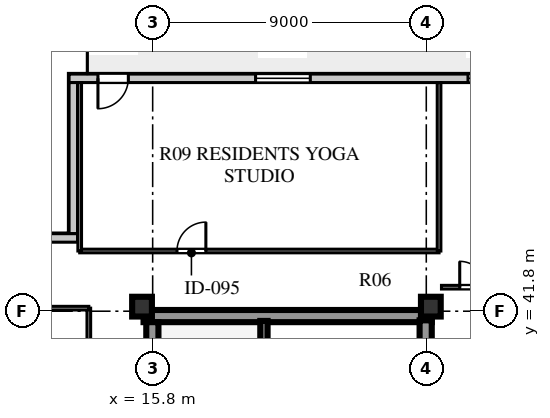
"""IFC4 building model, lengths in metres.
Left out: names, types, materials, properties, quantities, classifications, styles, units other than length and angle.
Written with IfcOpenShell. Run it as: python <this file> out.ifc"""

import sys

from ifc_helpers import new_model, si_unit, direction, frame, frame_2d, origin, origin_2d, place, context, subcontext, project, spatial, rectangle, extrude, element, fill, save


model = new_model("IFC4")
c1 = context("Model", 3, precision=1e-05, world=origin(), true_north=direction((0.0, 1.0)))
c2 = subcontext(c1, "Body", "Model", "MODEL_VIEW")
j1 = project(units=[si_unit("LENGTHUNIT", "METRE"), si_unit("PLANEANGLEUNIT", "RADIAN")], contexts=[c1])
p1 = place(None, origin())
s1 = spatial("IfcSite", under=j1, at=p1, CompositionType="ELEMENT")
p2 = place(p1, origin())
s2 = spatial("IfcBuilding", under=s1, at=p2, CompositionType="ELEMENT")
p3 = place(p2, frame((0.0, 0.0, 221.9)))
s3 = spatial("IfcBuildingStorey", under=s2, at=p3, CompositionType="ELEMENT", Elevation=221.9)
p4 = place(p3, frame((15.5, 41.64, 0.0), z_axis=(0.0, 0.0, 1.0), x_axis=(1.0, 0.0, 0.0)))
e1 = element("IfcWall", 1, at=p4, inside=s3, PredefinedType="SHEAR", context=c2, shape_type="SweptSolid", body=[
    extrude(rectangle(XDim=9.48, YDim=0.4, at=frame_2d((4.74, 0.0))), origin(), (0.0, 0.0, 1.0), 3.66),
])
p5 = place(p3, frame((15.79, 15.81, 0.0), z_axis=(0.0, 0.0, 1.0), x_axis=(0.0, 1.0, 0.0)))
e2 = element("IfcWall", 2, at=p5, inside=s3, PredefinedType="SHEAR", context=c2, shape_type="SweptSolid", body=[
    extrude(rectangle(XDim=25.63, YDim=0.4, at=frame_2d((12.815, 0.0))), origin(), (0.0, 0.0, 1.0), 3.66),
])
p6 = place(p3, frame((24.78, 15.74, 0.0), z_axis=(0.0, 0.0, 1.0), x_axis=(0.0, 1.0, 0.0)))
e3 = element("IfcWall", 3, at=p6, inside=s3, PredefinedType="SHEAR", context=c2, shape_type="SweptSolid", body=[
    extrude(rectangle(XDim=25.76, YDim=0.4, at=frame_2d((12.88, 0.0))), origin(), (0.0, 0.0, 1.0), 3.66),
])
p7 = place(p6, frame((1.61, 0.0, 0.0)))
e4 = element("IfcOpeningElement", 4, at=p7, cuts=e3, PredefinedType="OPENING", context=c2, shape_type="SweptSolid", body=[
    extrude(rectangle(XDim=1.2, YDim=2.1, at=frame_2d((0.6, 1.05))), frame((0.0, 0.21, 0.0), z_axis=(0.0, -1.0, 0.0), x_axis=(1.0, 0.0, 0.0)), (0.0, 0.0, 1.0), 0.42),
])
p8 = place(p6, frame((6.78, 0.0, 0.0)))
e5 = element("IfcOpeningElement", 5, at=p8, cuts=e3, PredefinedType="OPENING", context=c2, shape_type="SweptSolid", body=[
    extrude(rectangle(XDim=0.85, YDim=2.06, at=frame_2d((0.425, 1.03))), frame((0.0, 0.21, 0.0), z_axis=(0.0, -1.0, 0.0), x_axis=(1.0, 0.0, 0.0)), (0.0, 0.0, 1.0), 0.42),
])
p9 = place(p6, frame((12.11, 0.0, 0.0)))
e6 = element("IfcOpeningElement", 6, at=p9, cuts=e3, PredefinedType="OPENING", context=c2, shape_type="SweptSolid", body=[
    extrude(rectangle(XDim=1.5, YDim=2.12, at=frame_2d((0.75, 1.06))), frame((0.0, 0.21, 0.0), z_axis=(0.0, -1.0, 0.0), x_axis=(1.0, 0.0, 0.0)), (0.0, 0.0, 1.0), 0.42),
])
p10 = place(p6, frame((20.11, 0.0, 0.0)))
e7 = element("IfcOpeningElement", 7, at=p10, cuts=e3, PredefinedType="OPENING", context=c2, shape_type="SweptSolid", body=[
    extrude(rectangle(XDim=1.2, YDim=2.12, at=frame_2d((0.6, 1.06))), frame((0.0, 0.21, 0.0), z_axis=(0.0, -1.0, 0.0), x_axis=(1.0, 0.0, 0.0)), (0.0, 0.0, 1.0), 0.42),
])
p11 = place(p6, frame((24.01, 0.0, 0.0)))
e8 = element("IfcOpeningElement", 8, at=p11, cuts=e3, PredefinedType="OPENING", context=c2, shape_type="SweptSolid", body=[
    extrude(rectangle(XDim=0.95, YDim=2.1, at=frame_2d((0.475, 1.05))), frame((0.0, 0.21, 0.0), z_axis=(0.0, -1.0, 0.0), x_axis=(1.0, 0.0, 0.0)), (0.0, 0.0, 1.0), 0.42),
])
for number, where, z_axis, x_axis in (
    (9, (15.45, 41.95, 0.0), (0.0, 0.0, 1.0), (1.0, 0.0, 0.0)),
    (10, (24.95, 41.95, 0.0), (0.0, 0.0, 1.0), (1.0, 0.0, 0.0)),
):
    element("IfcColumn", number, at=place(p3, frame(where, z_axis=z_axis, x_axis=x_axis)), inside=s3, PredefinedType="COLUMN", context=c2, shape_type="SweptSolid", body=[
        extrude(rectangle(XDim=0.65, YDim=0.65, at=origin_2d()), origin(), (0.0, 0.0, 1.0), 3.66),
    ])
p12 = place(p3, frame((45.55, 49.46, 0.0), z_axis=(0.0, 0.0, 1.0), x_axis=(-1.0, 0.0, 0.0)))
e11 = element("IfcWall", 11, at=p12, inside=s3, PredefinedType="STANDARD", context=c2, shape_type="SweptSolid", body=[
    extrude(rectangle(XDim=32.5, YDim=0.28, at=frame_2d((16.25, 0.0))), origin(), (0.0, 0.0, 1.0), 3.66),
])
p13 = place(p12, frame((30.55, 0.0, 0.0)))
e12 = element("IfcOpeningElement", 12, at=p13, cuts=e11, PredefinedType="OPENING", context=c2, shape_type="SweptSolid", body=[
    extrude(rectangle(XDim=1.0, YDim=2.05, at=frame_2d((0.5, 1.025))), frame((0.0, 0.15, 0.0), z_axis=(0.0, -1.0, 0.0), x_axis=(1.0, 0.0, 0.0)), (0.0, 0.0, 1.0), 0.3),
])
p14 = place(p12, frame((24.565, 0.0, 0.8)))
e13 = element("IfcOpeningElement", 13, at=p14, cuts=e11, PredefinedType="OPENING", context=c2, shape_type="SweptSolid", body=[
    extrude(rectangle(XDim=1.8, YDim=2.0, at=frame_2d((0.9, 1.0))), frame((0.0, 0.15, 0.0), z_axis=(0.0, -1.0, 0.0), x_axis=(1.0, 0.0, 0.0)), (0.0, 0.0, 1.0), 0.3),
])
p15 = place(p12, frame((17.878, 0.0, 0.8)))
e14 = element("IfcOpeningElement", 14, at=p15, cuts=e11, PredefinedType="OPENING", context=c2, shape_type="SweptSolid", body=[
    extrude(rectangle(XDim=1.5, YDim=2.0, at=frame_2d((0.75, 1.0))), frame((0.0, 0.15, 0.0), z_axis=(0.0, -1.0, 0.0), x_axis=(1.0, 0.0, 0.0)), (0.0, 0.0, 1.0), 0.3),
])
p16 = place(p12, frame((13.278, 0.0, 0.8)))
e15 = element("IfcOpeningElement", 15, at=p16, cuts=e11, PredefinedType="OPENING", context=c2, shape_type="SweptSolid", body=[
    extrude(rectangle(XDim=1.2, YDim=1.75, at=frame_2d((0.6, 0.875))), frame((0.0, 0.15, 0.0), z_axis=(0.0, -1.0, 0.0), x_axis=(1.0, 0.0, 0.0)), (0.0, 0.0, 1.0), 0.3),
])
p17 = place(p12, frame((4.27, 0.0, 0.8)))
e16 = element("IfcOpeningElement", 16, at=p17, cuts=e11, PredefinedType="OPENING", context=c2, shape_type="SweptSolid", body=[
    extrude(rectangle(XDim=2.4, YDim=2.05, at=frame_2d((1.2, 1.025))), frame((0.0, 0.15, 0.0), z_axis=(0.0, -1.0, 0.0), x_axis=(1.0, 0.0, 0.0)), (0.0, 0.0, 1.0), 0.3),
])
p18 = place(p3, frame((13.19, 49.32, 0.0), z_axis=(0.0, 0.0, 1.0), x_axis=(0.0, -1.0, 0.0)))
e17 = element("IfcWall", 17, at=p18, inside=s3, PredefinedType="STANDARD", context=c2, shape_type="SweptSolid", body=[
    extrude(rectangle(XDim=4.97, YDim=0.28, at=frame_2d((2.485, 0.0))), origin(), (0.0, 0.0, 1.0), 3.66),
])
p19 = place(p3, frame((13.33, 44.21, 0.0), z_axis=(0.0, 0.0, 1.0), x_axis=(-1.0, 0.0, 0.0)))
e18 = element("IfcWall", 18, at=p19, inside=s3, PredefinedType="STANDARD", context=c2, shape_type="SweptSolid", body=[
    extrude(rectangle(XDim=5.53, YDim=0.28, at=frame_2d((2.765, 0.0))), origin(), (0.0, 0.0, 1.0), 3.66),
])
p20 = place(p3, frame((19.46, 33.3, 0.0), z_axis=(0.0, 0.0, 1.0), x_axis=(0.0, 1.0, 0.0)))
e19 = element("IfcWall", 19, at=p20, inside=s3, PredefinedType="SHEAR", context=c2, shape_type="SweptSolid", body=[
    extrude(rectangle(XDim=8.18, YDim=0.24, at=frame_2d((4.09, 0.0))), origin(), (0.0, 0.0, 1.0), 3.9),
])
p21 = place(p20, frame((0.65, 0.0, 0.0)))
e20 = element("IfcOpeningElement", 20, at=p21, cuts=e19, PredefinedType="OPENING", context=c2, shape_type="SweptSolid", body=[
    extrude(rectangle(XDim=1.1, YDim=2.1, at=frame_2d((0.55, 1.05))), frame((0.0, 0.13, 0.0), z_axis=(0.0, -1.0, 0.0), x_axis=(1.0, 0.0, 0.0)), (0.0, 0.0, 1.0), 0.26),
])
p22 = place(p3, frame((13.4, 43.78, 0.0), z_axis=(0.0, 0.0, 1.0), x_axis=(1.0, 0.0, 0.0)))
e21 = element("IfcWall", 21, at=p22, inside=s3, PredefinedType="PARTITIONING", context=c2, shape_type="SweptSolid", body=[
    extrude(rectangle(XDim=11.82, YDim=0.12, at=frame_2d((5.91, 0.0))), origin(), (0.0, 0.0, 1.0), 3.66),
])
p23 = place(p22, frame((3.2, 0.0, 0.0)))
e22 = element("IfcOpeningElement", 22, at=p23, cuts=e21, PredefinedType="OPENING", context=c2, shape_type="SweptSolid", body=[
    extrude(rectangle(XDim=0.95, YDim=2.08, at=frame_2d((0.475, 1.04))), frame((0.0, 0.07, 0.0), z_axis=(0.0, -1.0, 0.0), x_axis=(1.0, 0.0, 0.0)), (0.0, 0.0, 1.0), 0.14),
])
p24 = place(p3, frame((13.4, 43.78, 0.0), z_axis=(0.0, 0.0, 1.0), x_axis=(0.0, 1.0, 0.0)))
e23 = element("IfcWall", 23, at=p24, inside=s3, PredefinedType="PARTITIONING", context=c2, shape_type="SweptSolid", body=[
    extrude(rectangle(XDim=5.54, YDim=0.12, at=frame_2d((2.77, 0.0))), origin(), (0.0, 0.0, 1.0), 3.66),
])
p25 = place(p3, frame((25.22, 43.78, 0.0), z_axis=(0.0, 0.0, 1.0), x_axis=(0.0, 1.0, 0.0)))
e24 = element("IfcWall", 24, at=p25, inside=s3, PredefinedType="PARTITIONING", context=c2, shape_type="SweptSolid", body=[
    extrude(rectangle(XDim=5.54, YDim=0.12, at=frame_2d((2.77, 0.0))), origin(), (0.0, 0.0, 1.0), 3.21),
])
p26 = place(p3, frame((13.7, 15.3, 0.0), z_axis=(0.0, 0.0, 1.0), x_axis=(0.0, 1.0, 0.0)))
e25 = element("IfcWall", 25, at=p26, inside=s3, PredefinedType="PARTITIONING", context=c2, shape_type="SweptSolid", body=[
    extrude(rectangle(XDim=26.6, YDim=0.12, at=frame_2d((13.3, 0.0))), origin(), (0.0, 0.0, 1.0), 3.66),
])
p27 = place(p26, frame((0.65, 0.0, 0.0)))
e26 = element("IfcOpeningElement", 26, at=p27, cuts=e25, PredefinedType="OPENING", context=c2, shape_type="SweptSolid", body=[
    extrude(rectangle(XDim=0.95, YDim=2.1, at=frame_2d((0.475, 1.05))), frame((0.0, 0.07, 0.0), z_axis=(0.0, -1.0, 0.0), x_axis=(1.0, 0.0, 0.0)), (0.0, 0.0, 1.0), 0.14),
])
p28 = place(p26, frame((13.95, 0.0, 0.0)))
e27 = element("IfcOpeningElement", 27, at=p28, cuts=e25, PredefinedType="OPENING", context=c2, shape_type="SweptSolid", body=[
    extrude(rectangle(XDim=0.95, YDim=2.1, at=frame_2d((0.475, 1.05))), frame((0.0, 0.07, 0.0), z_axis=(0.0, -1.0, 0.0), x_axis=(1.0, 0.0, 0.0)), (0.0, 0.0, 1.0), 0.14),
])
p29 = place(p3, frame((8.08, 41.9, 0.0), z_axis=(0.0, 0.0, 1.0), x_axis=(1.0, 0.0, 0.0)))
e28 = element("IfcWall", 28, at=p29, inside=s3, PredefinedType="PARTITIONING", context=c2, shape_type="SweptSolid", body=[
    extrude(rectangle(XDim=5.62, YDim=0.12, at=frame_2d((2.81, 0.0))), origin(), (0.0, 0.0, 1.0), 3.21),
])
p30 = place(p3, frame((25.3, 42.59, 0.0), z_axis=(0.0, 0.0, 1.0), x_axis=(1.0, 0.0, 0.0)))
e29 = element("IfcWall", 29, at=p30, inside=s3, PredefinedType="PARTITIONING", context=c2, shape_type="SweptSolid", body=[
    extrude(rectangle(XDim=9.34, YDim=0.12, at=frame_2d((4.67, 0.0))), origin(), (0.0, 0.0, 1.0), 3.66),
])
p31 = place(p30, frame((0.6, 0.0, 0.0)))
e30 = element("IfcOpeningElement", 30, at=p31, cuts=e29, PredefinedType="OPENING", context=c2, shape_type="SweptSolid", body=[
    extrude(rectangle(XDim=0.85, YDim=2.08, at=frame_2d((0.425, 1.04))), frame((0.0, 0.07, 0.0), z_axis=(0.0, -1.0, 0.0), x_axis=(1.0, 0.0, 0.0)), (0.0, 0.0, 1.0), 0.14),
])
p32 = place(p30, frame((3.573, 0.0, 0.0)))
e31 = element("IfcOpeningElement", 31, at=p32, cuts=e29, PredefinedType="OPENING", context=c2, shape_type="SweptSolid", body=[
    extrude(rectangle(XDim=0.85, YDim=2.08, at=frame_2d((0.425, 1.04))), frame((0.0, 0.07, 0.0), z_axis=(0.0, -1.0, 0.0), x_axis=(1.0, 0.0, 0.0)), (0.0, 0.0, 1.0), 0.14),
])
p33 = place(p13, frame((1.0, 0.0, 0.0), z_axis=(0.0, 0.0, 1.0), x_axis=(-1.0, 0.0, 0.0)))
e32 = element("IfcDoor", 32, at=p33, inside=s3, OperationType="SINGLE_SWING_LEFT", PredefinedType="DOOR", context=c2, shape_type="SweptSolid", body=[
    extrude(rectangle(XDim=1.0, YDim=2.05, at=frame_2d((0.5, 1.025))), frame((0.0, 0.025, 0.0), z_axis=(0.0, -1.0, 0.0), x_axis=(1.0, 0.0, 0.0)), (0.0, 0.0, 1.0), 0.05),
])
fill(e12, e32)
p34 = place(p14, origin())
e33 = element("IfcWindow", 33, at=p34, inside=s3, PartitioningType="SINGLE_PANEL", PredefinedType="WINDOW", context=c2, shape_type="SweptSolid", body=[
    extrude(rectangle(XDim=1.8, YDim=2.0, at=frame_2d((0.9, 1.0))), frame((0.0, 0.03, 0.0), z_axis=(0.0, -1.0, 0.0), x_axis=(1.0, 0.0, 0.0)), (0.0, 0.0, 1.0), 0.06),
])
fill(e13, e33)
p35 = place(p15, origin())
e34 = element("IfcWindow", 34, at=p35, inside=s3, PartitioningType="SINGLE_PANEL", PredefinedType="WINDOW", context=c2, shape_type="SweptSolid", body=[
    extrude(rectangle(XDim=1.5, YDim=2.0, at=frame_2d((0.75, 1.0))), frame((0.0, 0.03, 0.0), z_axis=(0.0, -1.0, 0.0), x_axis=(1.0, 0.0, 0.0)), (0.0, 0.0, 1.0), 0.06),
])
fill(e14, e34)
p36 = place(p23, origin())
e35 = element("IfcDoor", 35, at=p36, inside=s3, OperationType="SINGLE_SWING_RIGHT", PredefinedType="DOOR", context=c2, shape_type="SweptSolid", body=[
    extrude(rectangle(XDim=0.95, YDim=2.08, at=frame_2d((0.475, 1.04))), frame((0.0, 0.025, 0.0), z_axis=(0.0, -1.0, 0.0), x_axis=(1.0, 0.0, 0.0)), (0.0, 0.0, 1.0), 0.05),
])
fill(e22, e35)
p37 = place(p31, origin())
e36 = element("IfcDoor", 36, at=p37, inside=s3, OperationType="SINGLE_SWING_LEFT", PredefinedType="DOOR", context=c2, shape_type="SweptSolid", body=[
    extrude(rectangle(XDim=0.85, YDim=2.08, at=frame_2d((0.425, 1.04))), frame((0.0, 0.025, 0.0), z_axis=(0.0, -1.0, 0.0), x_axis=(1.0, 0.0, 0.0)), (0.0, 0.0, 1.0), 0.05),
])
fill(e30, e36)
save(model, sys.argv[1])
